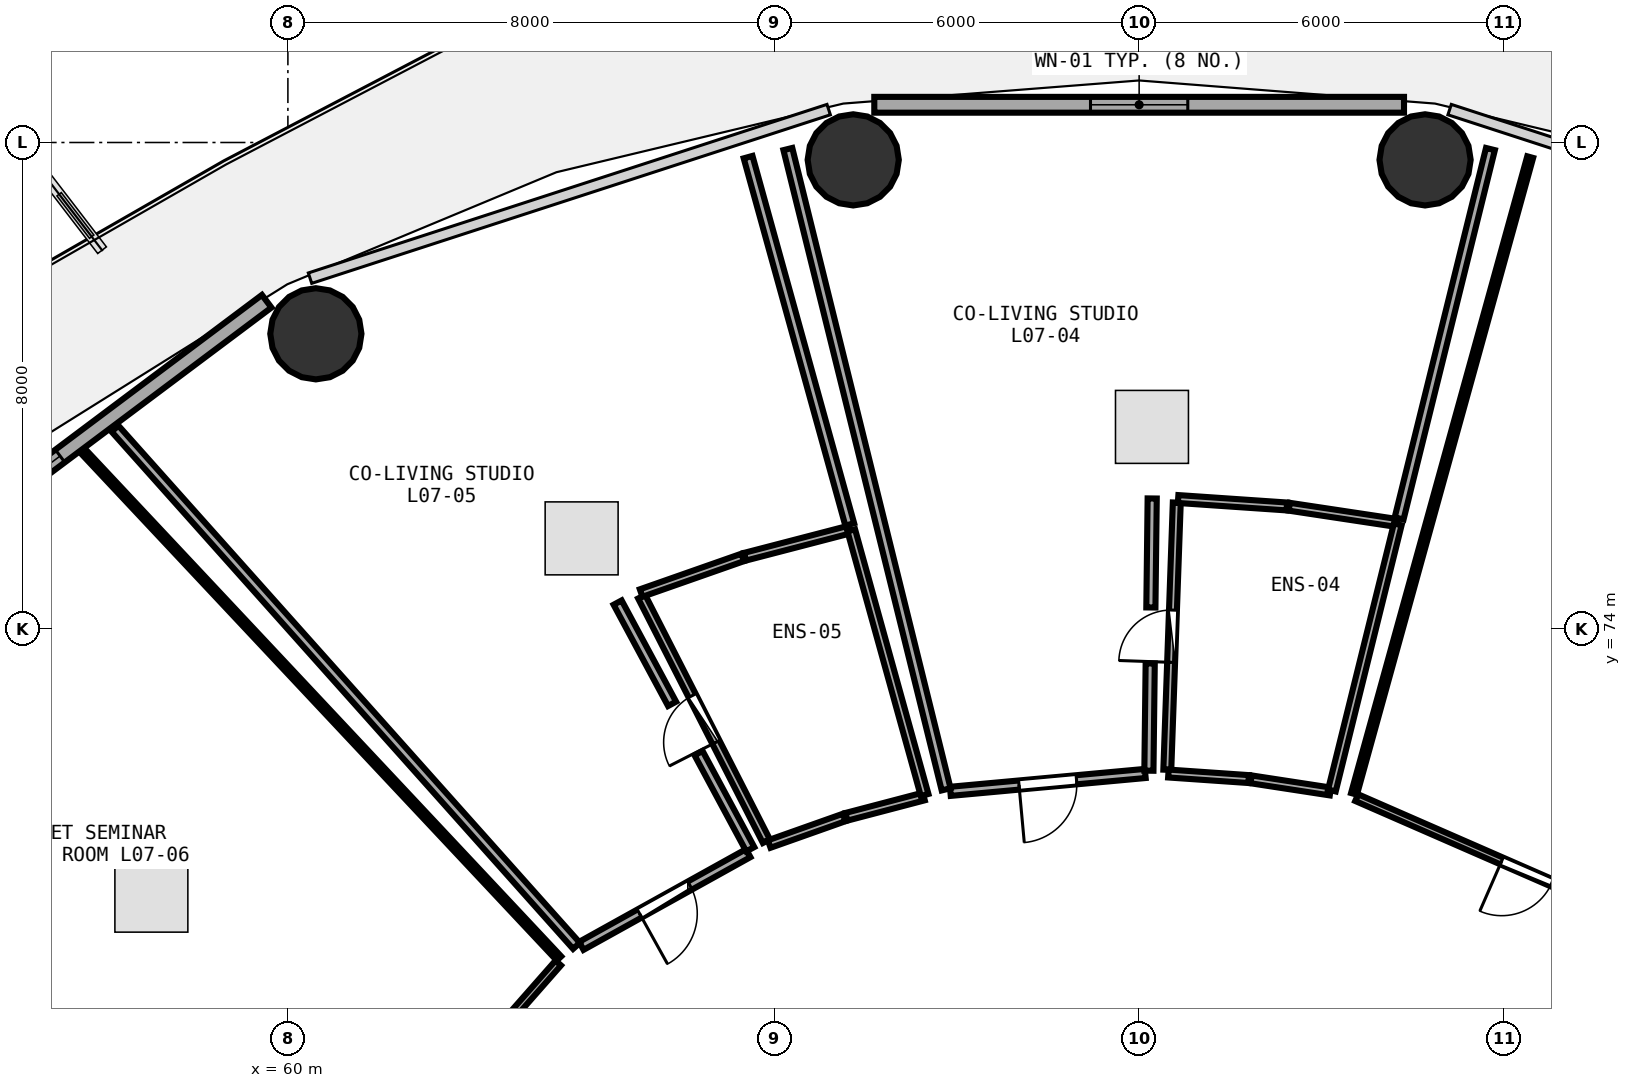
"""IFC4 building model, lengths in metres.
Left out: names, types, materials, properties, quantities, classifications, styles, units other than length and angle.
Written with IfcOpenShell. Run it as: python <this file> out.ifc"""

import sys

from ifc_helpers import new_model, si_unit, direction, frame, frame_2d, origin, origin_2d, place, context, subcontext, project, spatial, rectangle, circle, extrude, element, fill, save


model = new_model("IFC4")
c1 = context("Model", 3, precision=1e-05, world=origin(), true_north=direction((0.0, 1.0)))
c2 = subcontext(c1, "Body", "Model", "MODEL_VIEW")
j1 = project(units=[si_unit("LENGTHUNIT", "METRE"), si_unit("PLANEANGLEUNIT", "RADIAN")], contexts=[c1])
p1 = place(None, origin())
s1 = spatial("IfcSite", under=j1, at=p1, CompositionType="ELEMENT")
p2 = place(p1, origin())
s2 = spatial("IfcBuilding", under=s1, at=p2, CompositionType="ELEMENT")
p3 = place(p2, frame((0.0, 0.0, 30.0)))
s3 = spatial("IfcBuildingStorey", under=s2, at=p3, CompositionType="ELEMENT", Elevation=30.0)
for number, where, z_axis, x_axis in (
    (1, (78.702, 81.714, 0.0), (0.0, 0.0, 1.0), (1.0, 0.0, 0.0)),
    (2, (69.298, 81.714, 0.0), (0.0, 0.0, 1.0), (1.0, 0.0, 0.0)),
    (3, (60.46, 78.854, 0.0), (0.0, 0.0, 1.0), (1.0, 0.0, 0.0)),
):
    element("IfcColumn", number, at=place(p3, frame(where, z_axis=z_axis, x_axis=x_axis)), inside=s3, PredefinedType="COLUMN", context=c2, shape_type="SweptSolid", body=[
        extrude(circle(Radius=0.75, at=origin_2d()), origin(), (0.0, 0.0, 1.0), 3.75),
    ])
p4 = place(p3, frame((78.356, 82.62, 0.0), z_axis=(0.0, 0.0, 1.0), x_axis=(-1.0, 0.0, 0.0)))
e4 = element("IfcWall", 4, at=p4, inside=s3, PredefinedType="SOLIDWALL", context=c2, shape_type="SweptSolid", body=[
    extrude(rectangle(XDim=8.712, YDim=0.26, at=frame_2d((4.356, 0.0))), origin(), (0.0, 0.0, 1.0), 3.475),
])
p5 = place(p4, frame((3.556, 0.0, 0.85)))
e5 = element("IfcOpeningElement", 5, at=p5, cuts=e4, PredefinedType="OPENING", context=c2, shape_type="SweptSolid", body=[
    extrude(rectangle(XDim=1.6, YDim=1.45, at=frame_2d((0.8, 0.725))), frame((0.0, 0.14, 0.0), z_axis=(0.0, -1.0, 0.0), x_axis=(1.0, 0.0, 0.0)), (0.0, 0.0, 1.0), 0.28),
])
p6 = place(p3, frame((59.651, 79.389, 0.0), z_axis=(0.0, 0.0, 1.0), x_axis=(-0.80030733173, -0.599590005569, 0.0)))
e6 = element("IfcWall", 6, at=p6, inside=s3, PredefinedType="SOLIDWALL", context=c2, shape_type="SweptSolid", body=[
    extrude(rectangle(XDim=8.291, YDim=0.26, at=frame_2d((4.145, 0.0))), origin(), (0.0, 0.0, 1.0), 3.475),
])
p7 = place(p6, frame((4.245, 0.0, 0.85)))
e7 = element("IfcOpeningElement", 7, at=p7, cuts=e6, PredefinedType="OPENING", context=c2, shape_type="SweptSolid", body=[
    extrude(rectangle(XDim=1.6, YDim=1.45, at=frame_2d((0.8, 0.725))), frame((0.0, 0.14, 0.0), z_axis=(0.0, -1.0, 0.0), x_axis=(1.0, 0.0, 0.0)), (0.0, 0.0, 1.0), 0.28),
])
p8 = place(p3, frame((83.172, 68.783, 0.0), z_axis=(0.0, 0.0, 1.0), x_axis=(-0.916419655578, 0.400218708797, 0.0)))
e8 = element("IfcWall", 8, at=p8, inside=s3, PredefinedType="PARTITIONING", context=c2, shape_type="SweptSolid", body=[
    extrude(rectangle(XDim=6.104, YDim=0.12, at=frame_2d((3.052, 0.0))), origin(), (0.0, 0.0, 1.0), 2.875),
])
p9 = place(p8, frame((2.602, 0.0, 0.0)))
e9 = element("IfcOpeningElement", 9, at=p9, cuts=e8, PredefinedType="OPENING", context=c2, shape_type="SweptSolid", body=[
    extrude(rectangle(XDim=0.9, YDim=2.08, at=frame_2d((0.45, 1.04))), frame((0.0, 0.07, 0.0), z_axis=(0.0, -1.0, 0.0), x_axis=(1.0, 0.0, 0.0)), (0.0, 0.0, 1.0), 0.14),
])
p10 = place(p3, frame((74.463, 71.684, 0.0), z_axis=(0.0, 0.0, 1.0), x_axis=(0.035428098094, 0.999372227884, 0.0)))
e10 = element("IfcWall", 10, at=p10, inside=s3, PredefinedType="PLUMBINGWALL", context=c2, shape_type="SweptSolid", body=[
    extrude(rectangle(XDim=4.396, YDim=0.13, at=frame_2d((2.198, 0.0))), origin(), (0.0, 0.0, 1.0), 3.175),
])
p11 = place(p10, frame((1.768, 0.0, 0.0)))
e11 = element("IfcOpeningElement", 11, at=p11, cuts=e10, PredefinedType="OPENING", context=c2, shape_type="SweptSolid", body=[
    extrude(rectangle(XDim=0.86, YDim=2.05, at=frame_2d((0.43, 1.025))), frame((0.0, 0.075, 0.0), z_axis=(0.0, -1.0, 0.0), x_axis=(1.0, 0.0, 0.0)), (0.0, 0.0, 1.0), 0.15),
])
p12 = place(p3, frame((74.1, 71.624, 0.0), z_axis=(0.0, 0.0, 1.0), x_axis=(-0.995822031417, -0.091315287572, 0.0)))
e12 = element("IfcWall", 12, at=p12, inside=s3, PredefinedType="PARTITIONING", context=c2, shape_type="SweptSolid", body=[
    extrude(rectangle(XDim=3.219, YDim=0.15, at=frame_2d((1.609, 0.0))), origin(), (0.0, 0.0, 1.0), 3.235),
])
p13 = place(p12, frame((1.135, 0.0, 0.0)))
e13 = element("IfcOpeningElement", 13, at=p13, cuts=e12, PredefinedType="OPENING", context=c2, shape_type="SweptSolid", body=[
    extrude(rectangle(XDim=0.95, YDim=2.08, at=frame_2d((0.475, 1.04))), frame((0.0, 0.085, 0.0), z_axis=(0.0, -1.0, 0.0), x_axis=(1.0, 0.0, 0.0)), (0.0, 0.0, 1.0), 0.17),
])
p14 = place(p3, frame((67.87, 70.51, 0.0), z_axis=(0.0, 0.0, 1.0), x_axis=(-0.45442479933, 0.890785104138, 0.0)))
e14 = element("IfcWall", 14, at=p14, inside=s3, PredefinedType="PLUMBINGWALL", context=c2, shape_type="SweptSolid", body=[
    extrude(rectangle(XDim=4.514, YDim=0.13, at=frame_2d((2.257, 0.0))), origin(), (0.0, 0.0, 1.0), 3.175),
])
p15 = place(p14, frame((1.827, 0.0, 0.0)))
e15 = element("IfcOpeningElement", 15, at=p15, cuts=e14, PredefinedType="OPENING", context=c2, shape_type="SweptSolid", body=[
    extrude(rectangle(XDim=0.86, YDim=2.05, at=frame_2d((0.43, 1.025))), frame((0.0, 0.075, 0.0), z_axis=(0.0, -1.0, 0.0), x_axis=(1.0, 0.0, 0.0)), (0.0, 0.0, 1.0), 0.15),
])
p16 = place(p3, frame((67.571, 70.313, 0.0), z_axis=(0.0, 0.0, 1.0), x_axis=(-0.874179278891, -0.48560332408, 0.0)))
e16 = element("IfcWall", 16, at=p16, inside=s3, PredefinedType="PARTITIONING", context=c2, shape_type="SweptSolid", body=[
    extrude(rectangle(XDim=3.14, YDim=0.15, at=frame_2d((1.57, 0.0))), origin(), (0.0, 0.0, 1.0), 3.48),
])
p17 = place(p16, frame((1.095, 0.0, 0.0)))
e17 = element("IfcOpeningElement", 17, at=p17, cuts=e16, PredefinedType="OPENING", context=c2, shape_type="SweptSolid", body=[
    extrude(rectangle(XDim=0.95, YDim=2.08, at=frame_2d((0.475, 1.04))), frame((0.0, 0.085, 0.0), z_axis=(0.0, -1.0, 0.0), x_axis=(1.0, 0.0, 0.0)), (0.0, 0.0, 1.0), 0.17),
])
p18 = place(p3, frame((64.446, 68.507, 0.0), z_axis=(0.0, 0.0, 1.0), x_axis=(-0.660323401664, -0.75098136143, 0.0)))
e18 = element("IfcWall", 18, at=p18, inside=s3, PredefinedType="PARTITIONING", context=c2, shape_type="SweptSolid", body=[
    extrude(rectangle(XDim=5.857, YDim=0.12, at=frame_2d((2.929, 0.0))), origin(), (0.0, 0.0, 1.0), 2.875),
])
p19 = place(p18, frame((2.479, 0.0, 0.0)))
e19 = element("IfcOpeningElement", 19, at=p19, cuts=e18, PredefinedType="OPENING", context=c2, shape_type="SweptSolid", body=[
    extrude(rectangle(XDim=0.9, YDim=2.08, at=frame_2d((0.45, 1.04))), frame((0.0, 0.07, 0.0), z_axis=(0.0, -1.0, 0.0), x_axis=(1.0, 0.0, 0.0)), (0.0, 0.0, 1.0), 0.14),
])
p20 = place(p3, frame((77.534, 71.289, 0.0), z_axis=(0.0, 0.0, 1.0), x_axis=(0.26671307518, 0.963775977875, 0.0)))
e20 = element("IfcWall", 20, at=p20, inside=s3, PredefinedType="PARTITIONING", context=c2, shape_type="SweptSolid", body=[
    extrude(rectangle(XDim=10.865, YDim=0.1, at=frame_2d((5.432, 0.0))), origin(), (0.0, 0.0, 1.0), 2.875),
])
p21 = place(p3, frame((77.145, 71.327, 0.0), z_axis=(0.0, 0.0, 1.0), x_axis=(-0.988427236939, 0.151695739152, 0.0)))
e21 = element("IfcWall", 21, at=p21, inside=s3, PredefinedType="PLUMBINGWALL", context=c2, shape_type="SweptSolid", body=[
    extrude(rectangle(XDim=1.32, YDim=0.13, at=frame_2d((0.66, 0.0))), origin(), (0.0, 0.0, 1.0), 3.235),
])
p22 = place(p3, frame((75.801, 71.531, 0.0), z_axis=(0.0, 0.0, 1.0), x_axis=(-0.997629018134, 0.068821088175, 0.0)))
e22 = element("IfcWall", 22, at=p22, inside=s3, PredefinedType="PLUMBINGWALL", context=c2, shape_type="SweptSolid", body=[
    extrude(rectangle(XDim=1.323, YDim=0.13, at=frame_2d((0.662, 0.0))), origin(), (0.0, 0.0, 1.0), 3.48),
])
p23 = place(p3, frame((74.641, 76.137, 0.0), z_axis=(0.0, 0.0, 1.0), x_axis=(0.997667905772, -0.06825503493, 0.0)))
e23 = element("IfcWall", 23, at=p23, inside=s3, PredefinedType="PLUMBINGWALL", context=c2, shape_type="SweptSolid", body=[
    extrude(rectangle(XDim=1.792, YDim=0.13, at=frame_2d((0.896, 0.0))), origin(), (0.0, 0.0, 1.0), 3.48),
])
p24 = place(p3, frame((76.469, 76.01, 0.0), z_axis=(0.0, 0.0, 1.0), x_axis=(0.988799846431, -0.14924765894, 0.0)))
e24 = element("IfcWall", 24, at=p24, inside=s3, PredefinedType="PLUMBINGWALL", context=c2, shape_type="SweptSolid", body=[
    extrude(rectangle(XDim=1.79, YDim=0.13, at=frame_2d((0.895, 0.0))), origin(), (0.0, 0.0, 1.0), 3.48),
])
p25 = place(p3, frame((78.253, 75.721, 0.0), z_axis=(0.0, 0.0, 1.0), x_axis=(-0.240229117536, -0.970716215528, 0.0)))
e25 = element("IfcWall", 25, at=p25, inside=s3, PredefinedType="PLUMBINGWALL", context=c2, shape_type="SweptSolid", body=[
    extrude(rectangle(XDim=4.509, YDim=0.13, at=frame_2d((2.255, 0.0))), origin(), (0.0, 0.0, 1.0), 3.175),
])
p26 = place(p3, frame((70.825, 71.363, 0.0), z_axis=(0.0, 0.0, 1.0), x_axis=(-0.239971369295, 0.970779965759, 0.0)))
e26 = element("IfcWall", 26, at=p26, inside=s3, PredefinedType="PARTITIONING", context=c2, shape_type="SweptSolid", body=[
    extrude(rectangle(XDim=10.846, YDim=0.15, at=frame_2d((5.423, 0.0))), origin(), (0.0, 0.0, 1.0), 2.875),
])
p27 = place(p3, frame((79.777, 81.892, 0.0), z_axis=(0.0, 0.0, 1.0), x_axis=(-0.240000910349, -0.970772662899, 0.0)))
e27 = element("IfcWall", 27, at=p27, inside=s3, PredefinedType="PARTITIONING", context=c2, shape_type="SweptSolid", body=[
    extrude(rectangle(XDim=6.257, YDim=0.15, at=frame_2d((3.128, 0.0))), origin(), (0.0, 0.0, 1.0), 2.875),
])
p28 = place(p3, frame((74.215, 76.146, 0.0), z_axis=(0.0, 0.0, 1.0), x_axis=(-0.012119496596, -0.999926556204, 0.0)))
e28 = element("IfcWall", 28, at=p28, inside=s3, PredefinedType="PARTITIONING", context=c2, shape_type="SweptSolid", body=[
    extrude(rectangle(XDim=1.793, YDim=0.15, at=frame_2d((0.896, 0.0))), origin(), (0.0, 0.0, 1.0), 3.175),
])
p29 = place(p3, frame((74.182, 73.433, 0.0), z_axis=(0.0, 0.0, 1.0), x_axis=(-0.01217734225, -0.999925853419, 0.0)))
e29 = element("IfcWall", 29, at=p29, inside=s3, PredefinedType="PARTITIONING", context=c2, shape_type="SweptSolid", body=[
    extrude(rectangle(XDim=1.764, YDim=0.15, at=frame_2d((0.882, 0.0))), origin(), (0.0, 0.0, 1.0), 3.48),
])
p30 = place(p3, frame((70.458, 71.245, 0.0), z_axis=(0.0, 0.0, 1.0), x_axis=(-0.967235526128, -0.253880753498, 0.0)))
e30 = element("IfcWall", 30, at=p30, inside=s3, PredefinedType="PLUMBINGWALL", context=c2, shape_type="SweptSolid", body=[
    extrude(rectangle(XDim=1.314, YDim=0.13, at=frame_2d((0.657, 0.0))), origin(), (0.0, 0.0, 1.0), 3.235),
])
p31 = place(p3, frame((69.148, 70.899, 0.0), z_axis=(0.0, 0.0, 1.0), x_axis=(-0.942537812533, -0.33409949408, 0.0)))
e31 = element("IfcWall", 31, at=p31, inside=s3, PredefinedType="PLUMBINGWALL", context=c2, shape_type="SweptSolid", body=[
    extrude(rectangle(XDim=1.307, YDim=0.13, at=frame_2d((0.654, 0.0))), origin(), (0.0, 0.0, 1.0), 3.48),
])
p32 = place(p3, frame((65.81, 74.591, 0.0), z_axis=(0.0, 0.0, 1.0), x_axis=(0.943615101484, 0.331044619728, 0.0)))
e32 = element("IfcWall", 32, at=p32, inside=s3, PredefinedType="PLUMBINGWALL", context=c2, shape_type="SweptSolid", body=[
    extrude(rectangle(XDim=1.77, YDim=0.13, at=frame_2d((0.885, 0.0))), origin(), (0.0, 0.0, 1.0), 3.48),
])
p33 = place(p3, frame((67.518, 75.188, 0.0), z_axis=(0.0, 0.0, 1.0), x_axis=(0.967790422801, 0.251757219427, 0.0)))
e33 = element("IfcWall", 33, at=p33, inside=s3, PredefinedType="PLUMBINGWALL", context=c2, shape_type="SweptSolid", body=[
    extrude(rectangle(XDim=1.78, YDim=0.13, at=frame_2d((0.89, 0.0))), origin(), (0.0, 0.0, 1.0), 3.48),
])
p34 = place(p3, frame((69.265, 75.622, 0.0), z_axis=(0.0, 0.0, 1.0), x_axis=(0.267094578575, -0.963670320232, 0.0)))
e34 = element("IfcWall", 34, at=p34, inside=s3, PredefinedType="PLUMBINGWALL", context=c2, shape_type="SweptSolid", body=[
    extrude(rectangle(XDim=4.516, YDim=0.13, at=frame_2d((2.258, 0.0))), origin(), (0.0, 0.0, 1.0), 2.875),
])
p35 = place(p3, frame((64.746, 68.789, 0.0), z_axis=(0.0, 0.0, 1.0), x_axis=(-0.66580890104, 0.746122313897, 0.0)))
e35 = element("IfcWall", 35, at=p35, inside=s3, PredefinedType="PARTITIONING", context=c2, shape_type="SweptSolid", body=[
    extrude(rectangle(XDim=11.399, YDim=0.15, at=frame_2d((5.7, 0.0))), origin(), (0.0, 0.0, 1.0), 2.875),
])
p36 = place(p3, frame((67.569, 81.76, 0.0), z_axis=(0.0, 0.0, 1.0), x_axis=(0.266691519666, -0.963781942837, 0.0)))
e36 = element("IfcWall", 36, at=p36, inside=s3, PredefinedType="PARTITIONING", context=c2, shape_type="SweptSolid", body=[
    extrude(rectangle(XDim=6.268, YDim=0.15, at=frame_2d((3.134, 0.0))), origin(), (0.0, 0.0, 1.0), 2.875),
])
p37 = place(p3, frame((65.423, 74.434, 0.0), z_axis=(0.0, 0.0, 1.0), x_axis=(0.473660949034, -0.880707275637, 0.0)))
e37 = element("IfcWall", 37, at=p37, inside=s3, PredefinedType="PARTITIONING", context=c2, shape_type="SweptSolid", body=[
    extrude(rectangle(XDim=1.891, YDim=0.15, at=frame_2d((0.946, 0.0))), origin(), (0.0, 0.0, 1.0), 3.175),
])
p38 = place(p3, frame((66.754, 71.958, 0.0), z_axis=(0.0, 0.0, 1.0), x_axis=(0.473466863657, -0.880811630838, 0.0)))
e38 = element("IfcWall", 38, at=p38, inside=s3, PredefinedType="PARTITIONING", context=c2, shape_type="SweptSolid", body=[
    extrude(rectangle(XDim=1.794, YDim=0.15, at=frame_2d((0.897, 0.0))), origin(), (0.0, 0.0, 1.0), 3.235),
])
p39 = place(p3, frame((60.502, 64.079, 0.0), z_axis=(0.0, 0.0, 1.0), x_axis=(-0.917695041134, 0.397285554077, 0.0)))
e39 = element("IfcWall", 39, at=p39, inside=s3, PredefinedType="PARTITIONING", context=c2, shape_type="SweptSolid", body=[
    extrude(rectangle(XDim=12.07, YDim=0.1, at=frame_2d((6.035, 0.0))), origin(), (0.0, 0.0, 1.0), 2.875),
])
p40 = place(p3, frame((56.632, 76.922, 0.0), z_axis=(0.0, 0.0, 1.0), x_axis=(0.684261294523, -0.729236916796, 0.0)))
e40 = element("IfcWall", 40, at=p40, inside=s3, PredefinedType="PARTITIONING", context=c2, shape_type="SweptSolid", body=[
    extrude(rectangle(XDim=11.438, YDim=0.1, at=frame_2d((5.719, 0.0))), origin(), (0.0, 0.0, 1.0), 2.875),
])
p41 = place(p5, origin())
e41 = element("IfcWindow", 41, at=p41, inside=s3, PartitioningType="SINGLE_PANEL", PredefinedType="WINDOW", context=c2, shape_type="SweptSolid", body=[
    extrude(rectangle(XDim=1.6, YDim=1.45, at=frame_2d((0.8, 0.725))), frame((0.0, 0.03, 0.0), z_axis=(0.0, -1.0, 0.0), x_axis=(1.0, 0.0, 0.0)), (0.0, 0.0, 1.0), 0.06),
])
fill(e5, e41)
p42 = place(p7, origin())
e42 = element("IfcWindow", 42, at=p42, inside=s3, PartitioningType="SINGLE_PANEL", PredefinedType="WINDOW", context=c2, shape_type="SweptSolid", body=[
    extrude(rectangle(XDim=1.6, YDim=1.45, at=frame_2d((0.8, 0.725))), frame((0.0, 0.03, 0.0), z_axis=(0.0, -1.0, 0.0), x_axis=(1.0, 0.0, 0.0)), (0.0, 0.0, 1.0), 0.06),
])
fill(e7, e42)
p43 = place(p9, origin())
e43 = element("IfcDoor", 43, at=p43, inside=s3, OperationType="SINGLE_SWING_RIGHT", PredefinedType="DOOR", context=c2, shape_type="SweptSolid", body=[
    extrude(rectangle(XDim=0.9, YDim=2.08, at=frame_2d((0.45, 1.04))), frame((0.0, 0.025, 0.0), z_axis=(0.0, -1.0, 0.0), x_axis=(1.0, 0.0, 0.0)), (0.0, 0.0, 1.0), 0.05),
])
fill(e9, e43)
p44 = place(p11, origin())
e44 = element("IfcDoor", 44, at=p44, inside=s3, OperationType="SINGLE_SWING_LEFT", PredefinedType="DOOR", context=c2, shape_type="SweptSolid", body=[
    extrude(rectangle(XDim=0.86, YDim=2.05, at=frame_2d((0.43, 1.025))), frame((0.0, 0.025, 0.0), z_axis=(0.0, -1.0, 0.0), x_axis=(1.0, 0.0, 0.0)), (0.0, 0.0, 1.0), 0.05),
])
fill(e11, e44)
p45 = place(p13, origin())
e45 = element("IfcDoor", 45, at=p45, inside=s3, OperationType="SINGLE_SWING_RIGHT", PredefinedType="DOOR", context=c2, shape_type="SweptSolid", body=[
    extrude(rectangle(XDim=0.95, YDim=2.08, at=frame_2d((0.475, 1.04))), frame((0.0, 0.025, 0.0), z_axis=(0.0, -1.0, 0.0), x_axis=(1.0, 0.0, 0.0)), (0.0, 0.0, 1.0), 0.05),
])
fill(e13, e45)
p46 = place(p15, origin())
e46 = element("IfcDoor", 46, at=p46, inside=s3, OperationType="SINGLE_SWING_LEFT", PredefinedType="DOOR", context=c2, shape_type="SweptSolid", body=[
    extrude(rectangle(XDim=0.86, YDim=2.05, at=frame_2d((0.43, 1.025))), frame((0.0, 0.025, 0.0), z_axis=(0.0, -1.0, 0.0), x_axis=(1.0, 0.0, 0.0)), (0.0, 0.0, 1.0), 0.05),
])
fill(e15, e46)
p47 = place(p17, origin())
e47 = element("IfcDoor", 47, at=p47, inside=s3, OperationType="SINGLE_SWING_RIGHT", PredefinedType="DOOR", context=c2, shape_type="SweptSolid", body=[
    extrude(rectangle(XDim=0.95, YDim=2.08, at=frame_2d((0.475, 1.04))), frame((0.0, 0.025, 0.0), z_axis=(0.0, -1.0, 0.0), x_axis=(1.0, 0.0, 0.0)), (0.0, 0.0, 1.0), 0.05),
])
fill(e17, e47)
save(model, sys.argv[1])
